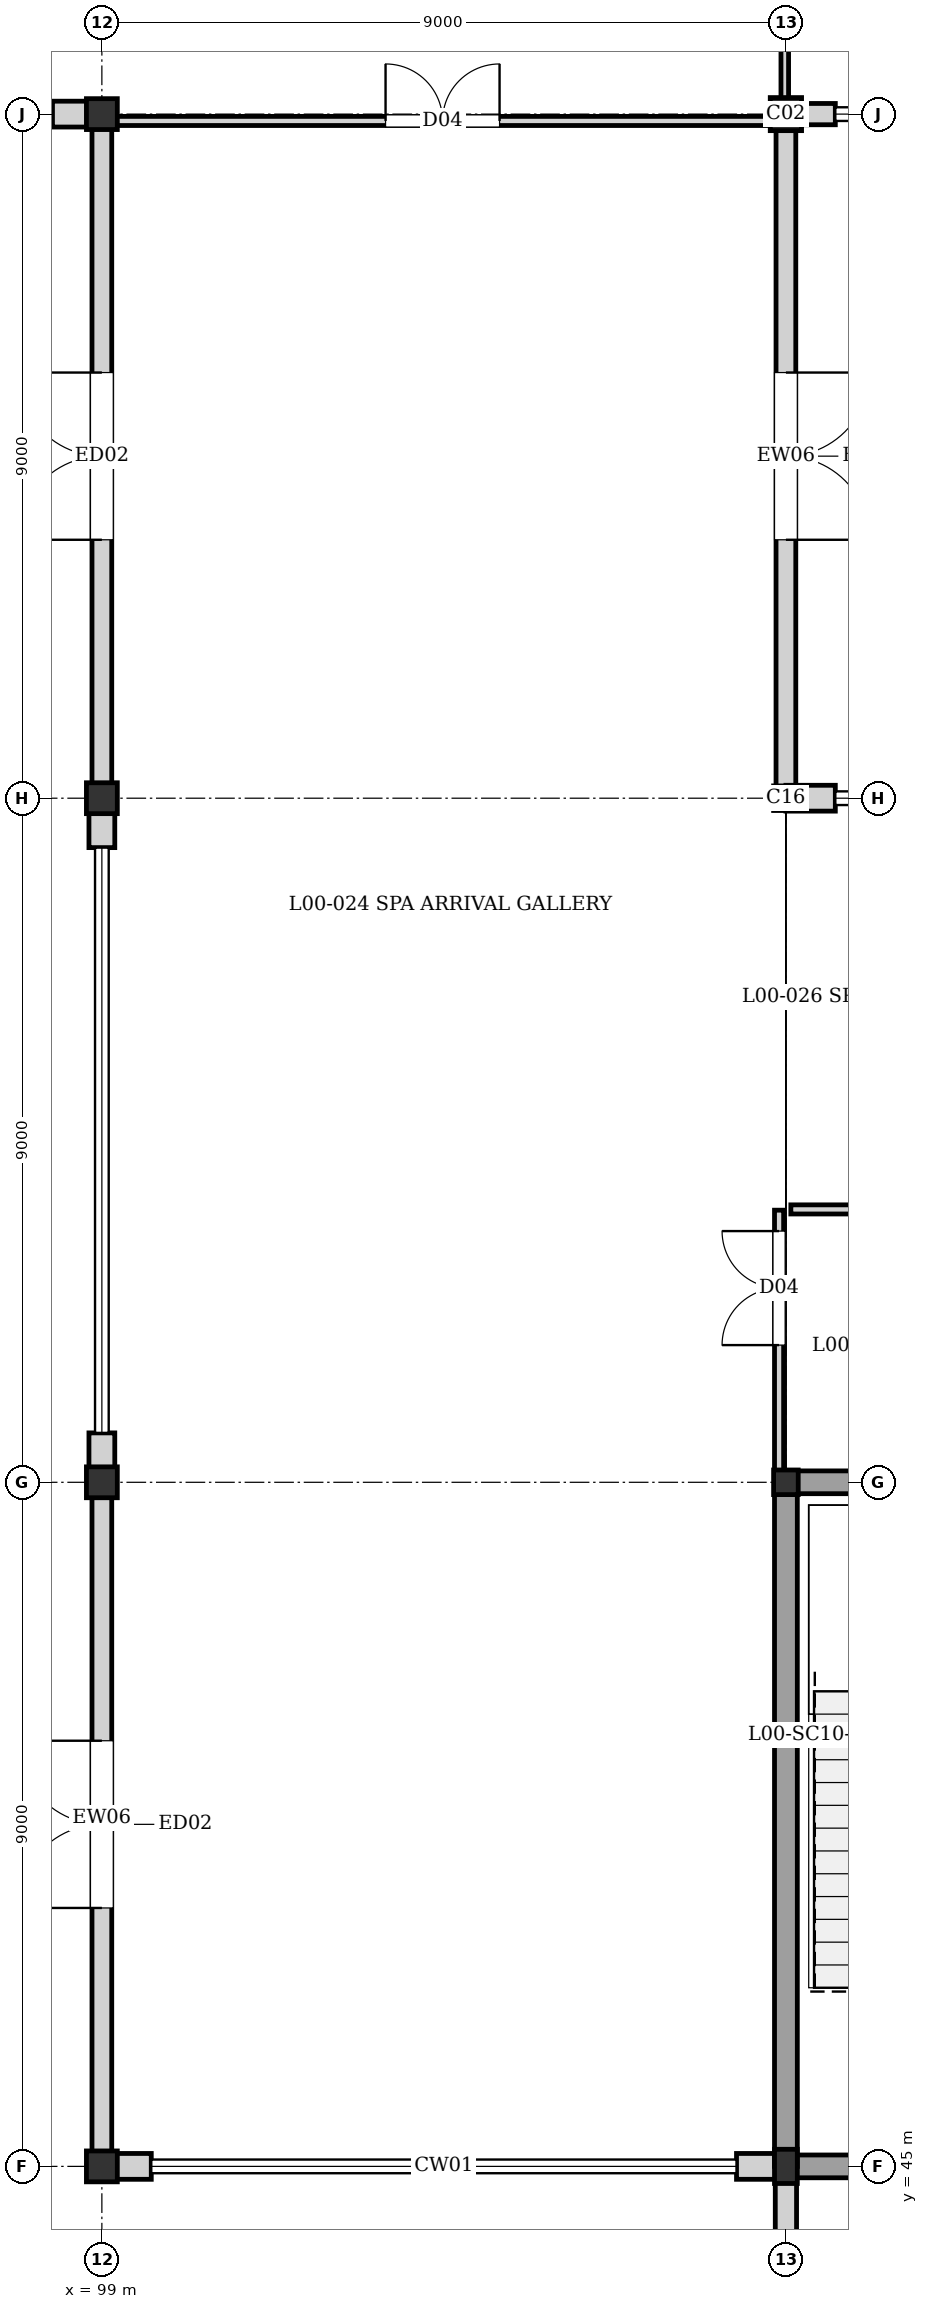
"""IFC4 building model, lengths in metres.
Left out: names, types, materials, properties, quantities, classifications, styles, units other than length and angle.
Written with IfcOpenShell. Run it as: python <this file> out.ifc"""

import sys

from ifc_helpers import new_model, si_unit, direction, frame, frame_2d, origin, origin_2d, place, context, subcontext, project, spatial, rectangle, hollow_circle, i_section, extrude, element, fill, save


model = new_model("IFC4")
c1 = context("Model", 3, precision=1e-05, world=origin(), true_north=direction((0.0, 1.0)))
c2 = subcontext(c1, "Body", "Model", "MODEL_VIEW")
j1 = project(units=[si_unit("LENGTHUNIT", "METRE"), si_unit("PLANEANGLEUNIT", "RADIAN")], contexts=[c1])
p1 = place(None, origin())
s1 = spatial("IfcSite", under=j1, at=p1, CompositionType="ELEMENT")
p2 = place(p1, origin())
s2 = spatial("IfcBuilding", under=s1, at=p2, CompositionType="ELEMENT")
p3 = place(p2, origin())
s3 = spatial("IfcBuildingStorey", under=s2, at=p3, CompositionType="ELEMENT", Elevation=0.0)
for number, where, z_axis, x_axis in (
    (1, (99.0, 45.0, 0.0), (0.0, 0.0, 1.0), (1.0, 0.0, 0.0)),
    (2, (99.0, 54.0, 0.0), (0.0, 0.0, 1.0), (1.0, 0.0, 0.0)),
    (3, (99.0, 63.0, 0.0), (0.0, 0.0, 1.0), (1.0, 0.0, 0.0)),
    (4, (99.0, 72.0, 0.0), (0.0, 0.0, 1.0), (1.0, 0.0, 0.0)),
):
    element("IfcColumn", number, at=place(p3, frame(where, z_axis=z_axis, x_axis=x_axis)), inside=s3, PredefinedType="COLUMN", context=c2, shape_type="SweptSolid", body=[
        extrude(hollow_circle(Radius=0.203, WallThickness=0.016, at=origin_2d()), origin(), (0.0, 0.0, 1.0), 4.32),
    ])
p4 = place(p3, frame((108.0, 45.0, 0.0), z_axis=(0.0, 0.0, 1.0), x_axis=(1.0, 0.0, 0.0)))
e5 = element("IfcColumn", 5, at=p4, inside=s3, PredefinedType="COLUMN", context=c2, shape_type="SweptSolid", body=[
    extrude(i_section(OverallWidth=0.3, OverallDepth=0.45, WebThickness=0.014, FlangeThickness=0.026, at=origin_2d()), origin(), (0.0, 0.0, 1.0), 4.32),
])
for number, where, z_axis, x_axis in (
    (6, (108.0, 54.0, 0.0), (0.0, 0.0, 1.0), (1.0, 0.0, 0.0)),
    (7, (108.0, 63.0, 0.0), (0.0, 0.0, 1.0), (1.0, 0.0, 0.0)),
):
    element("IfcColumn", number, at=place(p3, frame(where, z_axis=z_axis, x_axis=x_axis)), inside=s3, PredefinedType="COLUMN", context=c2, shape_type="SweptSolid", body=[
        extrude(hollow_circle(Radius=0.162, WallThickness=0.016, at=origin_2d()), origin(), (0.0, 0.0, 1.0), 4.32),
    ])
p5 = place(p3, frame((108.0, 72.0, 0.0), z_axis=(0.0, 0.0, 1.0), x_axis=(1.0, 0.0, 0.0)))
e8 = element("IfcColumn", 8, at=p5, inside=s3, PredefinedType="COLUMN", context=c2, shape_type="SweptSolid", body=[
    extrude(i_section(OverallWidth=0.412, OverallDepth=0.435, WebThickness=0.027, FlangeThickness=0.046, at=origin_2d()), origin(), (0.0, 0.0, 1.0), 4.32),
])
p6 = place(p3, frame((108.65, 72.0, 0.0), z_axis=(0.0, 0.0, 1.0), x_axis=(-1.0, 0.0, 0.0)))
e9 = element("IfcWall", 9, at=p6, inside=s3, PredefinedType="SOLIDWALL", context=c2, shape_type="SweptSolid", body=[
    extrude(rectangle(XDim=0.65, YDim=0.28, at=frame_2d((0.325, 0.0))), origin(), (0.0, 0.0, 1.0), 3.695),
])
p7 = place(p3, frame((108.0, 71.845, 0.0), z_axis=(0.0, 0.0, 1.0), x_axis=(0.0, -1.0, 0.0)))
e10 = element("IfcWall", 10, at=p7, inside=s3, PredefinedType="SOLIDWALL", context=c2, shape_type="SweptSolid", body=[
    extrude(rectangle(XDim=8.69, YDim=0.26, at=frame_2d((4.345, 0.0))), origin(), (0.0, 0.0, 1.0), 3.695),
])
p8 = place(p7, frame((3.245, 0.0, 0.0)))
e11 = element("IfcOpeningElement", 11, at=p8, cuts=e10, PredefinedType="OPENING", context=c2, shape_type="SweptSolid", body=[
    extrude(rectangle(XDim=2.2, YDim=2.5, at=frame_2d((1.1, 1.25))), frame((0.0, 0.14, 0.0), z_axis=(0.0, -1.0, 0.0), x_axis=(1.0, 0.0, 0.0)), (0.0, 0.0, 1.0), 0.28),
])
p9 = place(p3, frame((108.0, 63.0, 0.0), z_axis=(0.0, 0.0, 1.0), x_axis=(1.0, 0.0, 0.0)))
e12 = element("IfcWall", 12, at=p9, inside=s3, PredefinedType="SOLIDWALL", context=c2, shape_type="SweptSolid", body=[
    extrude(rectangle(XDim=0.65, YDim=0.34, at=frame_2d((0.325, 0.0))), origin(), (0.0, 0.0, 1.0), 3.695),
])
p10 = place(p3, frame((108.0, 36.0, 0.0), z_axis=(0.0, 0.0, 1.0), x_axis=(0.0, 1.0, 0.0)))
e13 = element("IfcWall", 13, at=p10, inside=s3, PredefinedType="SOLIDWALL", context=c2, shape_type="SweptSolid", body=[
    extrude(rectangle(XDim=8.87, YDim=0.28, at=frame_2d((4.435, 0.0))), origin(), (0.0, 0.0, 1.0), 3.655),
])
p11 = place(p10, frame((3.45, 0.0, 0.4)))
e14 = element("IfcOpeningElement", 14, at=p11, cuts=e13, PredefinedType="OPENING", context=c2, shape_type="SweptSolid", body=[
    extrude(rectangle(XDim=2.1, YDim=1.95, at=frame_2d((1.05, 0.975))), frame((0.0, 0.15, 0.0), z_axis=(0.0, -1.0, 0.0), x_axis=(1.0, 0.0, 0.0)), (0.0, 0.0, 1.0), 0.3),
])
p12 = place(p3, frame((107.87, 45.0, 0.0), z_axis=(0.0, 0.0, 1.0), x_axis=(-1.0, 0.0, 0.0)))
e15 = element("IfcWall", 15, at=p12, inside=s3, PredefinedType="SOLIDWALL", context=c2, shape_type="SweptSolid", body=[
    extrude(rectangle(XDim=0.52, YDim=0.34, at=frame_2d((0.26, 0.0))), origin(), (0.0, 0.0, 1.0), 3.755),
])
p13 = place(p3, frame((99.65, 45.0, 0.0), z_axis=(0.0, 0.0, 1.0), x_axis=(-1.0, 0.0, 0.0)))
e16 = element("IfcWall", 16, at=p13, inside=s3, PredefinedType="SOLIDWALL", context=c2, shape_type="SweptSolid", body=[
    extrude(rectangle(XDim=0.65, YDim=0.34, at=frame_2d((0.325, 0.0))), origin(), (0.0, 0.0, 1.0), 3.755),
])
p14 = place(p3, frame((99.0, 45.155, 0.0), z_axis=(0.0, 0.0, 1.0), x_axis=(0.0, 1.0, 0.0)))
e17 = element("IfcWall", 17, at=p14, inside=s3, PredefinedType="SOLIDWALL", context=c2, shape_type="SweptSolid", body=[
    extrude(rectangle(XDim=8.845, YDim=0.26, at=frame_2d((4.422, 0.0))), origin(), (0.0, 0.0, 1.0), 4.055),
])
p15 = place(p14, frame((3.245, 0.0, 0.0)))
e18 = element("IfcOpeningElement", 18, at=p15, cuts=e17, PredefinedType="OPENING", context=c2, shape_type="SweptSolid", body=[
    extrude(rectangle(XDim=2.2, YDim=2.5, at=frame_2d((1.1, 1.25))), frame((0.0, 0.14, 0.0), z_axis=(0.0, -1.0, 0.0), x_axis=(1.0, 0.0, 0.0)), (0.0, 0.0, 1.0), 0.28),
])
for number, where, z_axis, x_axis in (
    (19, (99.0, 54.0, 0.0), (0.0, 0.0, 1.0), (0.0, 1.0, 0.0)),
    (20, (99.0, 62.35, 0.0), (0.0, 0.0, 1.0), (0.0, 1.0, 0.0)),
):
    element("IfcWall", number, at=place(p3, frame(where, z_axis=z_axis, x_axis=x_axis)), inside=s3, PredefinedType="SOLIDWALL", context=c2, shape_type="SweptSolid", body=[
        extrude(rectangle(XDim=0.65, YDim=0.34, at=frame_2d((0.325, 0.0))), origin(), (0.0, 0.0, 1.0), 3.755),
    ])
p16 = place(p3, frame((99.0, 63.0, 0.0), z_axis=(0.0, 0.0, 1.0), x_axis=(0.0, 1.0, 0.0)))
e21 = element("IfcWall", 21, at=p16, inside=s3, PredefinedType="SOLIDWALL", context=c2, shape_type="SweptSolid", body=[
    extrude(rectangle(XDim=8.845, YDim=0.26, at=frame_2d((4.422, 0.0))), origin(), (0.0, 0.0, 1.0), 3.695),
])
p17 = place(p16, frame((3.4, 0.0, 0.0)))
e22 = element("IfcOpeningElement", 22, at=p17, cuts=e21, PredefinedType="OPENING", context=c2, shape_type="SweptSolid", body=[
    extrude(rectangle(XDim=2.2, YDim=2.5, at=frame_2d((1.1, 1.25))), frame((0.0, 0.14, 0.0), z_axis=(0.0, -1.0, 0.0), x_axis=(1.0, 0.0, 0.0)), (0.0, 0.0, 1.0), 0.28),
])
p18 = place(p3, frame((99.0, 72.0, 0.0), z_axis=(0.0, 0.0, 1.0), x_axis=(-1.0, 0.0, 0.0)))
e23 = element("IfcWall", 23, at=p18, inside=s3, PredefinedType="SOLIDWALL", context=c2, shape_type="SweptSolid", body=[
    extrude(rectangle(XDim=0.65, YDim=0.34, at=frame_2d((0.325, 0.0))), origin(), (0.0, 0.0, 1.0), 3.825),
])
p19 = place(p3, frame((117.0, 45.0, 0.0), z_axis=(0.0, 0.0, 1.0), x_axis=(-1.0, 0.0, 0.0)))
e24 = element("IfcWall", 24, at=p19, inside=s3, PredefinedType="SHEAR", context=c2, shape_type="SweptSolid", body=[
    extrude(rectangle(XDim=9.0, YDim=0.3, at=frame_2d((4.5, 0.0))), origin(), (0.0, 0.0, 1.0), 4.055),
])
p20 = place(p19, frame((5.7, 0.0, 0.0)))
e25 = element("IfcOpeningElement", 25, at=p20, cuts=e24, PredefinedType="OPENING", context=c2, shape_type="SweptSolid", body=[
    extrude(rectangle(XDim=1.8, YDim=2.2, at=frame_2d((0.9, 1.1))), frame((0.0, 0.16, 0.0), z_axis=(0.0, -1.0, 0.0), x_axis=(1.0, 0.0, 0.0)), (0.0, 0.0, 1.0), 0.32),
])
for number, where, z_axis, x_axis in (
    (26, (108.0, 54.0, 0.0), (0.0, 0.0, 1.0), (1.0, 0.0, 0.0)),
    (27, (108.0, 45.0, 0.0), (0.0, 0.0, 1.0), (0.0, 1.0, 0.0)),
):
    element("IfcWall", number, at=place(p3, frame(where, z_axis=z_axis, x_axis=x_axis)), inside=s3, PredefinedType="SHEAR", context=c2, shape_type="SweptSolid", body=[
        extrude(rectangle(XDim=9.0, YDim=0.3, at=frame_2d((4.5, 0.0))), origin(), (0.0, 0.0, 1.0), 4.055),
    ])
p21 = place(p3, frame((107.985, 72.145, 0.0), z_axis=(0.0, 0.0, 1.0), x_axis=(0.0, 1.0, 0.0)))
e28 = element("IfcWall", 28, at=p21, inside=s3, PredefinedType="PARTITIONING", context=c2, shape_type="SweptSolid", body=[
    extrude(rectangle(XDim=8.935, YDim=0.1, at=frame_2d((4.468, 0.0))), origin(), (0.0, 0.0, 1.0), 3.655),
])
p22 = place(p3, frame((99.135, 71.91, 0.0), z_axis=(0.0, 0.0, 1.0), x_axis=(1.0, 0.0, 0.0)))
e29 = element("IfcWall", 29, at=p22, inside=s3, PredefinedType="PARTITIONING", context=c2, shape_type="SweptSolid", body=[
    extrude(rectangle(XDim=8.695, YDim=0.12, at=frame_2d((4.348, 0.0))), origin(), (0.0, 0.0, 1.0), 3.755),
])
p23 = place(p22, frame((3.597, 0.0, 0.0)))
e30 = element("IfcOpeningElement", 30, at=p23, cuts=e29, PredefinedType="OPENING", context=c2, shape_type="SweptSolid", body=[
    extrude(rectangle(XDim=1.5, YDim=2.1, at=frame_2d((0.75, 1.05))), frame((0.0, 0.07, 0.0), z_axis=(0.0, -1.0, 0.0), x_axis=(1.0, 0.0, 0.0)), (0.0, 0.0, 1.0), 0.14),
])
p24 = place(p3, frame((107.91, 54.155, 0.0), z_axis=(0.0, 0.0, 1.0), x_axis=(0.0, 1.0, 0.0)))
e31 = element("IfcWall", 31, at=p24, inside=s3, PredefinedType="PARTITIONING", context=c2, shape_type="SweptSolid", body=[
    extrude(rectangle(XDim=3.425, YDim=0.12, at=frame_2d((1.712, 0.0))), origin(), (0.0, 0.0, 1.0), 3.755),
])
p25 = place(p24, frame((1.65, 0.0, 0.0)))
e32 = element("IfcOpeningElement", 32, at=p25, cuts=e31, PredefinedType="OPENING", context=c2, shape_type="SweptSolid", body=[
    extrude(rectangle(XDim=1.5, YDim=2.1, at=frame_2d((0.75, 1.05))), frame((0.0, 0.07, 0.0), z_axis=(0.0, -1.0, 0.0), x_axis=(1.0, 0.0, 0.0)), (0.0, 0.0, 1.0), 0.14),
])
p26 = place(p3, frame((108.065, 57.59, 0.0), z_axis=(0.0, 0.0, 1.0), x_axis=(1.0, 0.0, 0.0)))
e33 = element("IfcWall", 33, at=p26, inside=s3, PredefinedType="PARTITIONING", context=c2, shape_type="SweptSolid", body=[
    extrude(rectangle(XDim=8.845, YDim=0.12, at=frame_2d((4.422, 0.0))), origin(), (0.0, 0.0, 1.0), 4.055),
])
p27 = place(p26, frame((3.972, 0.0, 0.0)))
e34 = element("IfcOpeningElement", 34, at=p27, cuts=e33, PredefinedType="OPENING", context=c2, shape_type="SweptSolid", body=[
    extrude(rectangle(XDim=0.9, YDim=2.2, at=frame_2d((0.45, 1.1))), frame((0.0, 0.07, 0.0), z_axis=(0.0, -1.0, 0.0), x_axis=(1.0, 0.0, 0.0)), (0.0, 0.0, 1.0), 0.14),
])
p28 = place(p8, origin())
e35 = element("IfcDoor", 35, at=p28, inside=s3, OperationType="DOUBLE_DOOR_SINGLE_SWING", PredefinedType="DOOR", context=c2, shape_type="SweptSolid", body=[
    extrude(rectangle(XDim=2.2, YDim=2.5, at=frame_2d((1.1, 1.25))), frame((0.0, 0.025, 0.0), z_axis=(0.0, -1.0, 0.0), x_axis=(1.0, 0.0, 0.0)), (0.0, 0.0, 1.0), 0.05),
])
fill(e11, e35)
p29 = place(p15, origin())
e36 = element("IfcDoor", 36, at=p29, inside=s3, OperationType="DOUBLE_DOOR_SINGLE_SWING", PredefinedType="DOOR", context=c2, shape_type="SweptSolid", body=[
    extrude(rectangle(XDim=2.2, YDim=2.5, at=frame_2d((1.1, 1.25))), frame((0.0, 0.025, 0.0), z_axis=(0.0, -1.0, 0.0), x_axis=(1.0, 0.0, 0.0)), (0.0, 0.0, 1.0), 0.05),
])
fill(e18, e36)
p30 = place(p17, origin())
e37 = element("IfcDoor", 37, at=p30, inside=s3, OperationType="DOUBLE_DOOR_SINGLE_SWING", PredefinedType="DOOR", context=c2, shape_type="SweptSolid", body=[
    extrude(rectangle(XDim=2.2, YDim=2.5, at=frame_2d((1.1, 1.25))), frame((0.0, 0.025, 0.0), z_axis=(0.0, -1.0, 0.0), x_axis=(1.0, 0.0, 0.0)), (0.0, 0.0, 1.0), 0.05),
])
fill(e22, e37)
p31 = place(p23, origin())
e38 = element("IfcDoor", 38, at=p31, inside=s3, OperationType="DOUBLE_DOOR_SINGLE_SWING", PredefinedType="DOOR", context=c2, shape_type="SweptSolid", body=[
    extrude(rectangle(XDim=1.5, YDim=2.1, at=frame_2d((0.75, 1.05))), frame((0.0, 0.025, 0.0), z_axis=(0.0, -1.0, 0.0), x_axis=(1.0, 0.0, 0.0)), (0.0, 0.0, 1.0), 0.05),
])
fill(e30, e38)
p32 = place(p25, origin())
e39 = element("IfcDoor", 39, at=p32, inside=s3, OperationType="DOUBLE_DOOR_SINGLE_SWING", PredefinedType="DOOR", context=c2, shape_type="SweptSolid", body=[
    extrude(rectangle(XDim=1.5, YDim=2.1, at=frame_2d((0.75, 1.05))), frame((0.0, 0.025, 0.0), z_axis=(0.0, -1.0, 0.0), x_axis=(1.0, 0.0, 0.0)), (0.0, 0.0, 1.0), 0.05),
])
fill(e32, e39)
save(model, sys.argv[1])
